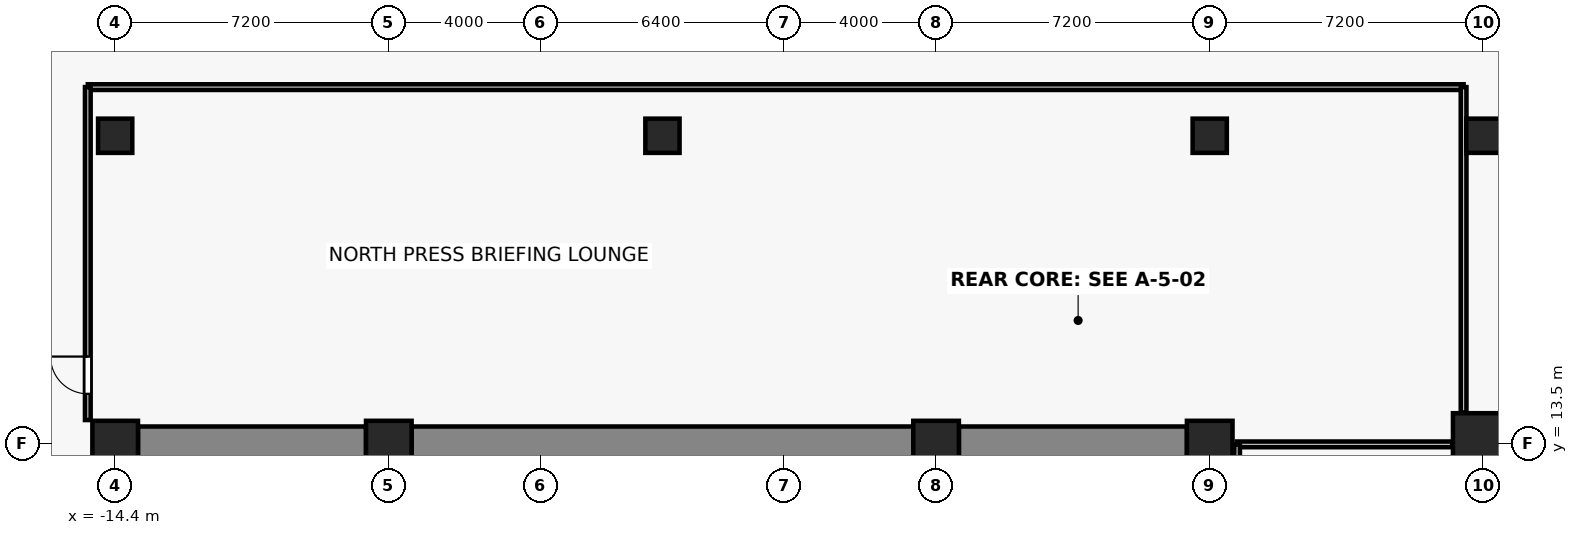
"""IFC4 building model, lengths in metres.
Left out: names, types, materials, properties, quantities, classifications, styles, units other than length and angle.
Written with IfcOpenShell. Run it as: python <this file> out.ifc"""

import sys

from ifc_helpers import new_model, si_unit, direction, frame, frame_2d, origin, origin_2d, place, context, subcontext, project, spatial, rectangle, extrude, source, transform, mapped, element, fill, save


model = new_model("IFC4")
c1 = context("Model", 3, precision=1e-05, world=origin(), true_north=direction((0.0, 1.0)))
c2 = subcontext(c1, "Body", "Model", "MODEL_VIEW")
j1 = project(units=[si_unit("LENGTHUNIT", "METRE"), si_unit("PLANEANGLEUNIT", "RADIAN")], contexts=[c1])
p1 = place(None, origin())
s1 = spatial("IfcSite", under=j1, at=p1, CompositionType="ELEMENT")
p2 = place(p1, origin())
s2 = spatial("IfcBuilding", under=s1, at=p2, CompositionType="ELEMENT")
p3 = place(p2, frame((0.0, 0.0, 5.0)))
s3 = spatial("IfcBuildingStorey", under=s2, at=p3, CompositionType="ELEMENT", Elevation=5.0)
for number, where, z_axis, x_axis in (
    (1, (-14.4, 13.5, 0.0), (0.0, 0.0, 1.0), (1.0, 0.0, 0.0)),
    (2, (-7.2, 13.5, 0.0), (0.0, 0.0, 1.0), (1.0, 0.0, 0.0)),
    (3, (7.2, 13.5, 0.0), (0.0, 0.0, 1.0), (1.0, 0.0, 0.0)),
    (4, (14.4, 13.5, 0.0), (0.0, 0.0, 1.0), (1.0, 0.0, 0.0)),
):
    element("IfcColumn", number, at=place(p3, frame(where, z_axis=z_axis, x_axis=x_axis)), inside=s3, PredefinedType="COLUMN", context=c2, shape_type="SweptSolid", body=[
        extrude(rectangle(XDim=1.2, YDim=1.2, at=origin_2d()), origin(), (0.0, 0.0, 1.0), 4.4),
    ])
p4 = place(p3, frame((21.6, 13.5, 0.0), z_axis=(0.0, 0.0, 1.0), x_axis=(1.0, 0.0, 0.0)))
e5 = element("IfcColumn", 5, at=p4, inside=s3, PredefinedType="COLUMN", context=c2, shape_type="SweptSolid", body=[
    extrude(rectangle(XDim=1.6, YDim=1.6, at=origin_2d()), origin(), (0.0, 0.0, 1.0), 4.4),
])
for number, where, z_axis, x_axis in (
    (6, (21.6, 21.6, 0.0), (0.0, 0.0, 1.0), (1.0, 0.0, 0.0)),
    (7, (-14.4, 21.6, 0.0), (0.0, 0.0, 1.0), (1.0, 0.0, 0.0)),
    (8, (0.0, 21.6, 0.0), (0.0, 0.0, 1.0), (1.0, 0.0, 0.0)),
    (9, (14.4, 21.6, 0.0), (0.0, 0.0, 1.0), (1.0, 0.0, 0.0)),
):
    element("IfcColumn", number, at=place(p3, frame(where, z_axis=z_axis, x_axis=x_axis)), inside=s3, PredefinedType="COLUMN", context=c2, shape_type="SweptSolid", body=[
        extrude(rectangle(XDim=0.9, YDim=0.9, at=origin_2d()), origin(), (0.0, 0.0, 1.0), 4.4),
    ])
p5 = place(p3, frame((-13.8, 13.5, 0.0), z_axis=(0.0, 0.0, 1.0), x_axis=(1.0, 0.0, 0.0)))
e10 = element("IfcWall", 10, at=p5, inside=s3, PredefinedType="SHEAR", context=c2, shape_type="SweptSolid", body=[
    extrude(rectangle(XDim=6.0, YDim=0.9, at=frame_2d((3.0, 0.0))), origin(), (0.0, 0.0, 1.0), 4.1),
])
p6 = place(p3, frame((-6.6, 13.5, 0.0), z_axis=(0.0, 0.0, 1.0), x_axis=(1.0, 0.0, 0.0)))
e11 = element("IfcWall", 11, at=p6, inside=s3, PredefinedType="SHEAR", context=c2, shape_type="SweptSolid", body=[
    extrude(rectangle(XDim=13.2, YDim=0.9, at=frame_2d((6.6, 0.0))), origin(), (0.0, 0.0, 1.0), 4.1),
])
p7 = place(p3, frame((7.8, 13.5, 0.0), z_axis=(0.0, 0.0, 1.0), x_axis=(1.0, 0.0, 0.0)))
e12 = element("IfcWall", 12, at=p7, inside=s3, PredefinedType="SHEAR", context=c2, shape_type="SweptSolid", body=[
    extrude(rectangle(XDim=6.0, YDim=0.9, at=frame_2d((3.0, 0.0))), origin(), (0.0, 0.0, 1.0), 4.1),
])
p8 = place(p3, frame((15.12, 13.48, 0.0), z_axis=(0.0, 0.0, 1.0), x_axis=(1.0, 0.0, 0.0)))
e13 = element("IfcWall", 13, at=p8, inside=s3, PredefinedType="PARTITIONING", context=c2, shape_type="SweptSolid", body=[
    extrude(rectangle(XDim=5.66, YDim=0.15, at=frame_2d((2.83, 0.0))), origin(), (0.0, 0.0, 1.0), 3.19),
])
p9 = place(p3, frame((15.12, -1.67, 0.0), z_axis=(0.0, 0.0, 1.0), x_axis=(0.0, 1.0, 0.0)))
e14 = element("IfcWall", 14, at=p9, inside=s3, PredefinedType="PARTITIONING", context=c2, shape_type="SweptSolid", body=[
    extrude(rectangle(XDim=15.15, YDim=0.15, at=frame_2d((7.575, 0.0))), origin(), (0.0, 0.0, 1.0), 3.19),
])
p10 = place(p3, frame((-15.12, 22.88, 0.0), z_axis=(0.0, 0.0, 1.0), x_axis=(1.0, 0.0, 0.0)))
e15 = element("IfcWall", 15, at=p10, inside=s3, PredefinedType="PARTITIONING", context=c2, shape_type="SweptSolid", body=[
    extrude(rectangle(XDim=36.2, YDim=0.15, at=frame_2d((18.1, 0.0))), origin(), (0.0, 0.0, 1.0), 4.1),
])
p11 = place(p3, frame((-15.12, 14.12, 0.0), z_axis=(0.0, 0.0, 1.0), x_axis=(0.0, 1.0, 0.0)))
e16 = element("IfcWall", 16, at=p11, inside=s3, PredefinedType="PARTITIONING", context=c2, shape_type="SweptSolid", body=[
    extrude(rectangle(XDim=8.76, YDim=0.15, at=frame_2d((4.38, 0.0))), origin(), (0.0, 0.0, 1.0), 3.19),
])
p12 = place(p11, frame((0.69, 0.0, 0.0)))
e17 = element("IfcOpeningElement", 17, at=p12, cuts=e16, PredefinedType="OPENING", context=c2, shape_type="SweptSolid", body=[
    extrude(rectangle(XDim=0.98, YDim=2.15, at=frame_2d((0.49, 1.075))), frame((0.0, 0.085, 0.0), z_axis=(0.0, -1.0, 0.0), x_axis=(1.0, 0.0, 0.0)), (0.0, 0.0, 1.0), 0.17),
])
p13 = place(p3, frame((21.08, 22.88, 0.0), z_axis=(0.0, 0.0, 1.0), x_axis=(0.0, -1.0, 0.0)))
e18 = element("IfcWall", 18, at=p13, inside=s3, PredefinedType="PARTITIONING", context=c2, shape_type="SweptSolid", body=[
    extrude(rectangle(XDim=8.56, YDim=0.15, at=frame_2d((4.28, 0.0))), origin(), (0.0, 0.0, 1.0), 3.19),
])
m1 = source(origin(), c2, "Body", "SweptSolid", [
    extrude(rectangle(XDim=0.98, YDim=2.15, at=frame_2d((0.49, 1.075))), frame((0.0, 0.025, 0.0), z_axis=(0.0, -1.0, 0.0), x_axis=(1.0, 0.0, 0.0)), (0.0, 0.0, 1.0), 0.05),
])
p14 = place(p12, origin())
e19 = element("IfcDoor", 19, at=p14, inside=s3, OperationType="SINGLE_SWING_RIGHT", PredefinedType="DOOR", context=c2, shape_type="MappedRepresentation", body=[
    mapped(m1, transform((0.0, 0.0, 0.0), x_axis=(1.0, 0.0, 0.0), y_axis=(0.0, 1.0, 0.0), z_axis=(0.0, 0.0, 1.0), scale=1.0)),
])
fill(e17, e19)
save(model, sys.argv[1])
